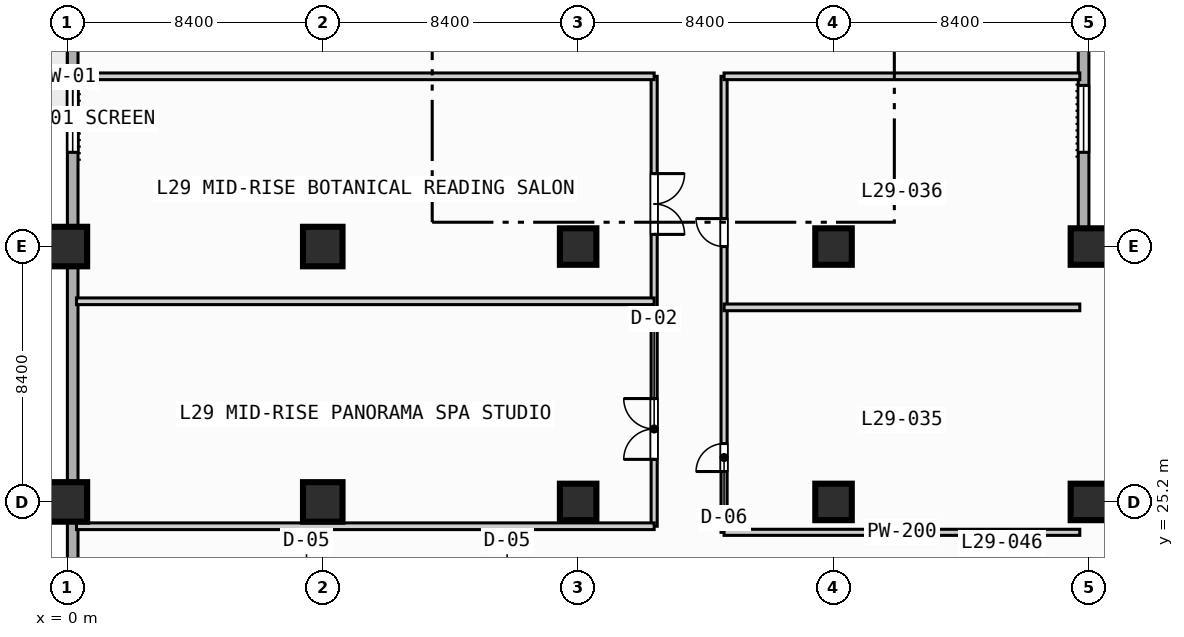
"""IFC4 building model, lengths in metres.
Left out: names, types, materials, properties, quantities, classifications, styles, units other than length and angle.
Written with IfcOpenShell. Run it as: python <this file> out.ifc"""

import sys

from ifc_helpers import new_model, si_unit, direction, frame, frame_2d, origin, origin_2d, place, context, subcontext, project, spatial, rectangle, extrude, element, fill, save


model = new_model("IFC4")
c1 = context("Model", 3, precision=1e-05, world=origin(), true_north=direction((0.0, 1.0)))
c2 = subcontext(c1, "Body", "Model", "MODEL_VIEW")
j1 = project(units=[si_unit("LENGTHUNIT", "METRE"), si_unit("PLANEANGLEUNIT", "RADIAN")], contexts=[c1])
p1 = place(None, origin())
s1 = spatial("IfcSite", under=j1, at=p1, CompositionType="ELEMENT")
p2 = place(p1, origin())
s2 = spatial("IfcBuilding", under=s1, at=p2, CompositionType="ELEMENT")
p3 = place(p2, frame((0.0, 0.0, 122.8)))
s3 = spatial("IfcBuildingStorey", under=s2, at=p3, CompositionType="ELEMENT", Elevation=122.8)
for number, where, z_axis, x_axis in (
    (1, (0.0, 25.2, 0.0), (0.0, 0.0, 1.0), (1.0, 0.0, 0.0)),
    (2, (0.0, 33.6, 0.0), (0.0, 0.0, 1.0), (1.0, 0.0, 0.0)),
    (3, (8.4, 25.2, 0.0), (0.0, 0.0, 1.0), (1.0, 0.0, 0.0)),
    (4, (8.4, 33.6, 0.0), (0.0, 0.0, 1.0), (1.0, 0.0, 0.0)),
):
    element("IfcColumn", number, at=place(p3, frame(where, z_axis=z_axis, x_axis=x_axis)), inside=s3, PredefinedType="COLUMN", context=c2, shape_type="SweptSolid", body=[
        extrude(rectangle(XDim=1.3, YDim=1.3, at=origin_2d()), origin(), (0.0, 0.0, 1.0), 3.8),
    ])
for number, where, z_axis, x_axis in (
    (5, (16.8, 25.2, 0.0), (0.0, 0.0, 1.0), (1.0, 0.0, 0.0)),
    (6, (16.8, 33.6, 0.0), (0.0, 0.0, 1.0), (1.0, 0.0, 0.0)),
    (7, (25.2, 25.2, 0.0), (0.0, 0.0, 1.0), (1.0, 0.0, 0.0)),
    (8, (25.2, 33.6, 0.0), (0.0, 0.0, 1.0), (1.0, 0.0, 0.0)),
    (9, (33.6, 25.2, 0.0), (0.0, 0.0, 1.0), (1.0, 0.0, 0.0)),
    (10, (33.6, 33.6, 0.0), (0.0, 0.0, 1.0), (1.0, 0.0, 0.0)),
):
    element("IfcColumn", number, at=place(p3, frame(where, z_axis=z_axis, x_axis=x_axis)), inside=s3, PredefinedType="COLUMN", context=c2, shape_type="SweptSolid", body=[
        extrude(rectangle(XDim=1.2, YDim=1.2, at=origin_2d()), origin(), (0.0, 0.0, 1.0), 3.8),
    ])
p4 = place(p3, frame((0.175, 3.175, 0.0), z_axis=(0.0, 0.0, 1.0), x_axis=(0.0, 1.0, 0.0)))
e11 = element("IfcWall", 11, at=p4, inside=s3, PredefinedType="STANDARD", context=c2, shape_type="SweptSolid", body=[
    extrude(rectangle(XDim=86.05, YDim=0.35, at=frame_2d((43.025, 0.0))), origin(), (0.0, 0.0, 1.0), 3.55),
])
p5 = place(p4, frame((42.325, 0.0, 0.0)))
e12 = element("IfcOpeningElement", 12, at=p5, cuts=e11, PredefinedType="OPENING", context=c2, shape_type="SweptSolid", body=[
    extrude(rectangle(XDim=1.4, YDim=2.2, at=frame_2d((0.7, 1.1))), frame((0.0, 0.185, 0.0), z_axis=(0.0, -1.0, 0.0), x_axis=(1.0, 0.0, 0.0)), (0.0, 0.0, 1.0), 0.37),
])
p6 = place(p4, frame((33.525, 0.0, 0.85)))
e13 = element("IfcOpeningElement", 13, at=p6, cuts=e11, PredefinedType="OPENING", context=c2, shape_type="SweptSolid", body=[
    extrude(rectangle(XDim=2.2, YDim=1.8, at=frame_2d((1.1, 0.9))), frame((0.0, 0.185, 0.0), z_axis=(0.0, -1.0, 0.0), x_axis=(1.0, 0.0, 0.0)), (0.0, 0.0, 1.0), 0.37),
])
p7 = place(p4, frame((58.725, 0.0, 0.85)))
e14 = element("IfcOpeningElement", 14, at=p7, cuts=e11, PredefinedType="OPENING", context=c2, shape_type="SweptSolid", body=[
    extrude(rectangle(XDim=2.2, YDim=1.8, at=frame_2d((1.1, 0.9))), frame((0.0, 0.185, 0.0), z_axis=(0.0, -1.0, 0.0), x_axis=(1.0, 0.0, 0.0)), (0.0, 0.0, 1.0), 0.37),
])
p8 = place(p4, frame((65.125, 0.0, 0.85)))
e15 = element("IfcOpeningElement", 15, at=p8, cuts=e11, PredefinedType="OPENING", context=c2, shape_type="SweptSolid", body=[
    extrude(rectangle(XDim=1.8, YDim=1.8, at=frame_2d((0.9, 0.9))), frame((0.0, 0.185, 0.0), z_axis=(0.0, -1.0, 0.0), x_axis=(1.0, 0.0, 0.0)), (0.0, 0.0, 1.0), 0.37),
])
p9 = place(p4, frame((73.275, 0.0, 0.85)))
e16 = element("IfcOpeningElement", 16, at=p9, cuts=e11, PredefinedType="OPENING", context=c2, shape_type="SweptSolid", body=[
    extrude(rectangle(XDim=1.8, YDim=1.8, at=frame_2d((0.9, 0.9))), frame((0.0, 0.185, 0.0), z_axis=(0.0, -1.0, 0.0), x_axis=(1.0, 0.0, 0.0)), (0.0, 0.0, 1.0), 0.37),
])
p10 = place(p4, frame((81.625, 0.0, 0.85)))
e17 = element("IfcOpeningElement", 17, at=p10, cuts=e11, PredefinedType="OPENING", context=c2, shape_type="SweptSolid", body=[
    extrude(rectangle(XDim=1.8, YDim=1.8, at=frame_2d((0.9, 0.9))), frame((0.0, 0.185, 0.0), z_axis=(0.0, -1.0, 0.0), x_axis=(1.0, 0.0, 0.0)), (0.0, 0.0, 1.0), 0.37),
])
p11 = place(p3, frame((33.425, 89.225, 0.0), z_axis=(0.0, 0.0, 1.0), x_axis=(0.0, -1.0, 0.0)))
e18 = element("IfcWall", 18, at=p11, inside=s3, PredefinedType="STANDARD", context=c2, shape_type="SweptSolid", body=[
    extrude(rectangle(XDim=55.8, YDim=0.35, at=frame_2d((27.9, 0.0))), origin(), (0.0, 0.0, 1.0), 3.55),
])
p12 = place(p11, frame((50.325, 0.0, 0.85)))
e19 = element("IfcOpeningElement", 19, at=p12, cuts=e18, PredefinedType="OPENING", context=c2, shape_type="SweptSolid", body=[
    extrude(rectangle(XDim=2.2, YDim=1.8, at=frame_2d((1.1, 0.9))), frame((0.0, 0.185, 0.0), z_axis=(0.0, -1.0, 0.0), x_axis=(1.0, 0.0, 0.0)), (0.0, 0.0, 1.0), 0.37),
])
p13 = place(p11, frame((33.525, 0.0, 0.85)))
e20 = element("IfcOpeningElement", 20, at=p13, cuts=e18, PredefinedType="OPENING", context=c2, shape_type="SweptSolid", body=[
    extrude(rectangle(XDim=2.2, YDim=1.8, at=frame_2d((1.1, 0.9))), frame((0.0, 0.185, 0.0), z_axis=(0.0, -1.0, 0.0), x_axis=(1.0, 0.0, 0.0)), (0.0, 0.0, 1.0), 0.37),
])
p14 = place(p11, frame((25.125, 0.0, 0.85)))
e21 = element("IfcOpeningElement", 21, at=p14, cuts=e18, PredefinedType="OPENING", context=c2, shape_type="SweptSolid", body=[
    extrude(rectangle(XDim=2.2, YDim=1.8, at=frame_2d((1.1, 0.9))), frame((0.0, 0.185, 0.0), z_axis=(0.0, -1.0, 0.0), x_axis=(1.0, 0.0, 0.0)), (0.0, 0.0, 1.0), 0.37),
])
p15 = place(p11, frame((16.725, 0.0, 0.85)))
e22 = element("IfcOpeningElement", 22, at=p15, cuts=e18, PredefinedType="OPENING", context=c2, shape_type="SweptSolid", body=[
    extrude(rectangle(XDim=2.2, YDim=1.8, at=frame_2d((1.1, 0.9))), frame((0.0, 0.185, 0.0), z_axis=(0.0, -1.0, 0.0), x_axis=(1.0, 0.0, 0.0)), (0.0, 0.0, 1.0), 0.37),
])
p16 = place(p11, frame((8.325, 0.0, 0.85)))
e23 = element("IfcOpeningElement", 23, at=p16, cuts=e18, PredefinedType="OPENING", context=c2, shape_type="SweptSolid", body=[
    extrude(rectangle(XDim=2.2, YDim=1.8, at=frame_2d((1.1, 0.9))), frame((0.0, 0.185, 0.0), z_axis=(0.0, -1.0, 0.0), x_axis=(1.0, 0.0, 0.0)), (0.0, 0.0, 1.0), 0.37),
])
p17 = place(p3, frame((33.425, 33.425, 0.0), z_axis=(0.0, 0.0, 1.0), x_axis=(1.0, 0.0, 0.0)))
e24 = element("IfcWall", 24, at=p17, inside=s3, PredefinedType="STANDARD", context=c2, shape_type="SweptSolid", body=[
    extrude(rectangle(XDim=39.0, YDim=0.35, at=frame_2d((19.5, 0.0))), origin(), (0.0, 0.0, 1.0), 3.55),
])
p18 = place(p17, frame((12.075, 0.0, 0.0)))
e25 = element("IfcOpeningElement", 25, at=p18, cuts=e24, PredefinedType="OPENING", context=c2, shape_type="SweptSolid", body=[
    extrude(rectangle(XDim=1.4, YDim=2.2, at=frame_2d((0.7, 1.1))), frame((0.0, 0.185, 0.0), z_axis=(0.0, -1.0, 0.0), x_axis=(1.0, 0.0, 0.0)), (0.0, 0.0, 1.0), 0.37),
])
p19 = place(p3, frame((21.6, 24.2, 0.0), z_axis=(0.0, 0.0, 1.0), x_axis=(0.0, 1.0, 0.0)))
e26 = element("IfcWall", 26, at=p19, inside=s3, PredefinedType="PARTITIONING", context=c2, shape_type="SweptSolid", body=[
    extrude(rectangle(XDim=15.0, YDim=0.2, at=frame_2d((7.5, 0.0))), origin(), (0.0, 0.0, 1.0), 3.55),
])
p20 = place(p19, frame((2.0, 0.0, 0.0)))
e27 = element("IfcOpeningElement", 27, at=p20, cuts=e26, PredefinedType="OPENING", context=c2, shape_type="SweptSolid", body=[
    extrude(rectangle(XDim=0.92, YDim=2.1, at=frame_2d((0.46, 1.05))), frame((0.0, 0.11, 0.0), z_axis=(0.0, -1.0, 0.0), x_axis=(1.0, 0.0, 0.0)), (0.0, 0.0, 1.0), 0.22),
])
p21 = place(p19, frame((9.4, 0.0, 0.0)))
e28 = element("IfcOpeningElement", 28, at=p21, cuts=e26, PredefinedType="OPENING", context=c2, shape_type="SweptSolid", body=[
    extrude(rectangle(XDim=0.92, YDim=2.1, at=frame_2d((0.46, 1.05))), frame((0.0, 0.11, 0.0), z_axis=(0.0, -1.0, 0.0), x_axis=(1.0, 0.0, 0.0)), (0.0, 0.0, 1.0), 0.22),
])
p22 = place(p3, frame((21.6, 24.2, 0.0), z_axis=(0.0, 0.0, 1.0), x_axis=(1.0, 0.0, 0.0)))
e29 = element("IfcWall", 29, at=p22, inside=s3, PredefinedType="PARTITIONING", context=c2, shape_type="SweptSolid", body=[
    extrude(rectangle(XDim=11.7, YDim=0.2, at=frame_2d((5.85, 0.0))), origin(), (0.0, 0.0, 1.0), 3.55),
])
for number, where, z_axis, x_axis in (
    (30, (21.6, 31.6, 0.0), (0.0, 0.0, 1.0), (1.0, 0.0, 0.0)),
    (31, (21.6, 39.2, 0.0), (0.0, 0.0, 1.0), (1.0, 0.0, 0.0)),
):
    element("IfcWall", number, at=place(p3, frame(where, z_axis=z_axis, x_axis=x_axis)), inside=s3, PredefinedType="PARTITIONING", context=c2, shape_type="SweptSolid", body=[
        extrude(rectangle(XDim=11.7, YDim=0.22, at=frame_2d((5.85, 0.0))), origin(), (0.0, 0.0, 1.0), 3.55),
    ])
p23 = place(p3, frame((19.3, 24.4, 0.0), z_axis=(0.0, 0.0, 1.0), x_axis=(0.0, 1.0, 0.0)))
e32 = element("IfcWall", 32, at=p23, inside=s3, PredefinedType="PARTITIONING", context=c2, shape_type="SweptSolid", body=[
    extrude(rectangle(XDim=14.8, YDim=0.2, at=frame_2d((7.4, 0.0))), origin(), (0.0, 0.0, 1.0), 3.55),
])
p24 = place(p23, frame((2.2, 0.0, 0.0)))
e33 = element("IfcOpeningElement", 33, at=p24, cuts=e32, PredefinedType="OPENING", context=c2, shape_type="SweptSolid", body=[
    extrude(rectangle(XDim=2.0, YDim=2.15, at=frame_2d((1.0, 1.075))), frame((0.0, 0.11, 0.0), z_axis=(0.0, -1.0, 0.0), x_axis=(1.0, 0.0, 0.0)), (0.0, 0.0, 1.0), 0.22),
])
p25 = place(p23, frame((9.6, 0.0, 0.0)))
e34 = element("IfcOpeningElement", 34, at=p25, cuts=e32, PredefinedType="OPENING", context=c2, shape_type="SweptSolid", body=[
    extrude(rectangle(XDim=2.0, YDim=2.15, at=frame_2d((1.0, 1.075))), frame((0.0, 0.11, 0.0), z_axis=(0.0, -1.0, 0.0), x_axis=(1.0, 0.0, 0.0)), (0.0, 0.0, 1.0), 0.22),
])
for number, where, z_axis, x_axis in (
    (35, (0.3, 24.4, 0.0), (0.0, 0.0, 1.0), (1.0, 0.0, 0.0)),
    (36, (0.3, 31.8, 0.0), (0.0, 0.0, 1.0), (1.0, 0.0, 0.0)),
    (37, (0.3, 39.2, 0.0), (0.0, 0.0, 1.0), (1.0, 0.0, 0.0)),
):
    element("IfcWall", number, at=place(p3, frame(where, z_axis=z_axis, x_axis=x_axis)), inside=s3, PredefinedType="PARTITIONING", context=c2, shape_type="SweptSolid", body=[
        extrude(rectangle(XDim=19.0, YDim=0.22, at=frame_2d((9.5, 0.0))), origin(), (0.0, 0.0, 1.0), 3.55),
    ])
p26 = place(p6, origin())
e38 = element("IfcWindow", 38, at=p26, inside=s3, PartitioningType="SINGLE_PANEL", PredefinedType="WINDOW", context=c2, shape_type="SweptSolid", body=[
    extrude(rectangle(XDim=2.2, YDim=1.8, at=frame_2d((1.1, 0.9))), frame((0.0, 0.03, 0.0), z_axis=(0.0, -1.0, 0.0), x_axis=(1.0, 0.0, 0.0)), (0.0, 0.0, 1.0), 0.06),
])
fill(e13, e38)
p27 = place(p12, origin())
e39 = element("IfcWindow", 39, at=p27, inside=s3, PartitioningType="SINGLE_PANEL", PredefinedType="WINDOW", context=c2, shape_type="SweptSolid", body=[
    extrude(rectangle(XDim=2.2, YDim=1.8, at=frame_2d((1.1, 0.9))), frame((0.0, 0.03, 0.0), z_axis=(0.0, -1.0, 0.0), x_axis=(1.0, 0.0, 0.0)), (0.0, 0.0, 1.0), 0.06),
])
fill(e19, e39)
p28 = place(p20, origin())
e40 = element("IfcDoor", 40, at=p28, inside=s3, OperationType="SINGLE_SWING_LEFT", PredefinedType="DOOR", context=c2, shape_type="SweptSolid", body=[
    extrude(rectangle(XDim=0.92, YDim=2.1, at=frame_2d((0.46, 1.05))), frame((0.0, 0.025, 0.0), z_axis=(0.0, -1.0, 0.0), x_axis=(1.0, 0.0, 0.0)), (0.0, 0.0, 1.0), 0.05),
])
fill(e27, e40)
p29 = place(p21, origin())
e41 = element("IfcDoor", 41, at=p29, inside=s3, OperationType="SINGLE_SWING_RIGHT", PredefinedType="DOOR", context=c2, shape_type="SweptSolid", body=[
    extrude(rectangle(XDim=0.92, YDim=2.1, at=frame_2d((0.46, 1.05))), frame((0.0, 0.025, 0.0), z_axis=(0.0, -1.0, 0.0), x_axis=(1.0, 0.0, 0.0)), (0.0, 0.0, 1.0), 0.05),
])
fill(e28, e41)
p30 = place(p24, origin())
e42 = element("IfcDoor", 42, at=p30, inside=s3, OperationType="SINGLE_SWING_LEFT", PredefinedType="DOOR", context=c2, shape_type="SweptSolid", body=[
    extrude(rectangle(XDim=2.0, YDim=2.15, at=frame_2d((1.0, 1.075))), frame((0.0, 0.025, 0.0), z_axis=(0.0, -1.0, 0.0), x_axis=(1.0, 0.0, 0.0)), (0.0, 0.0, 1.0), 0.05),
])
fill(e33, e42)
p31 = place(p25, origin())
e43 = element("IfcDoor", 43, at=p31, inside=s3, OperationType="SINGLE_SWING_RIGHT", PredefinedType="DOOR", context=c2, shape_type="SweptSolid", body=[
    extrude(rectangle(XDim=2.0, YDim=2.15, at=frame_2d((1.0, 1.075))), frame((0.0, 0.025, 0.0), z_axis=(0.0, -1.0, 0.0), x_axis=(1.0, 0.0, 0.0)), (0.0, 0.0, 1.0), 0.05),
])
fill(e34, e43)
save(model, sys.argv[1])
